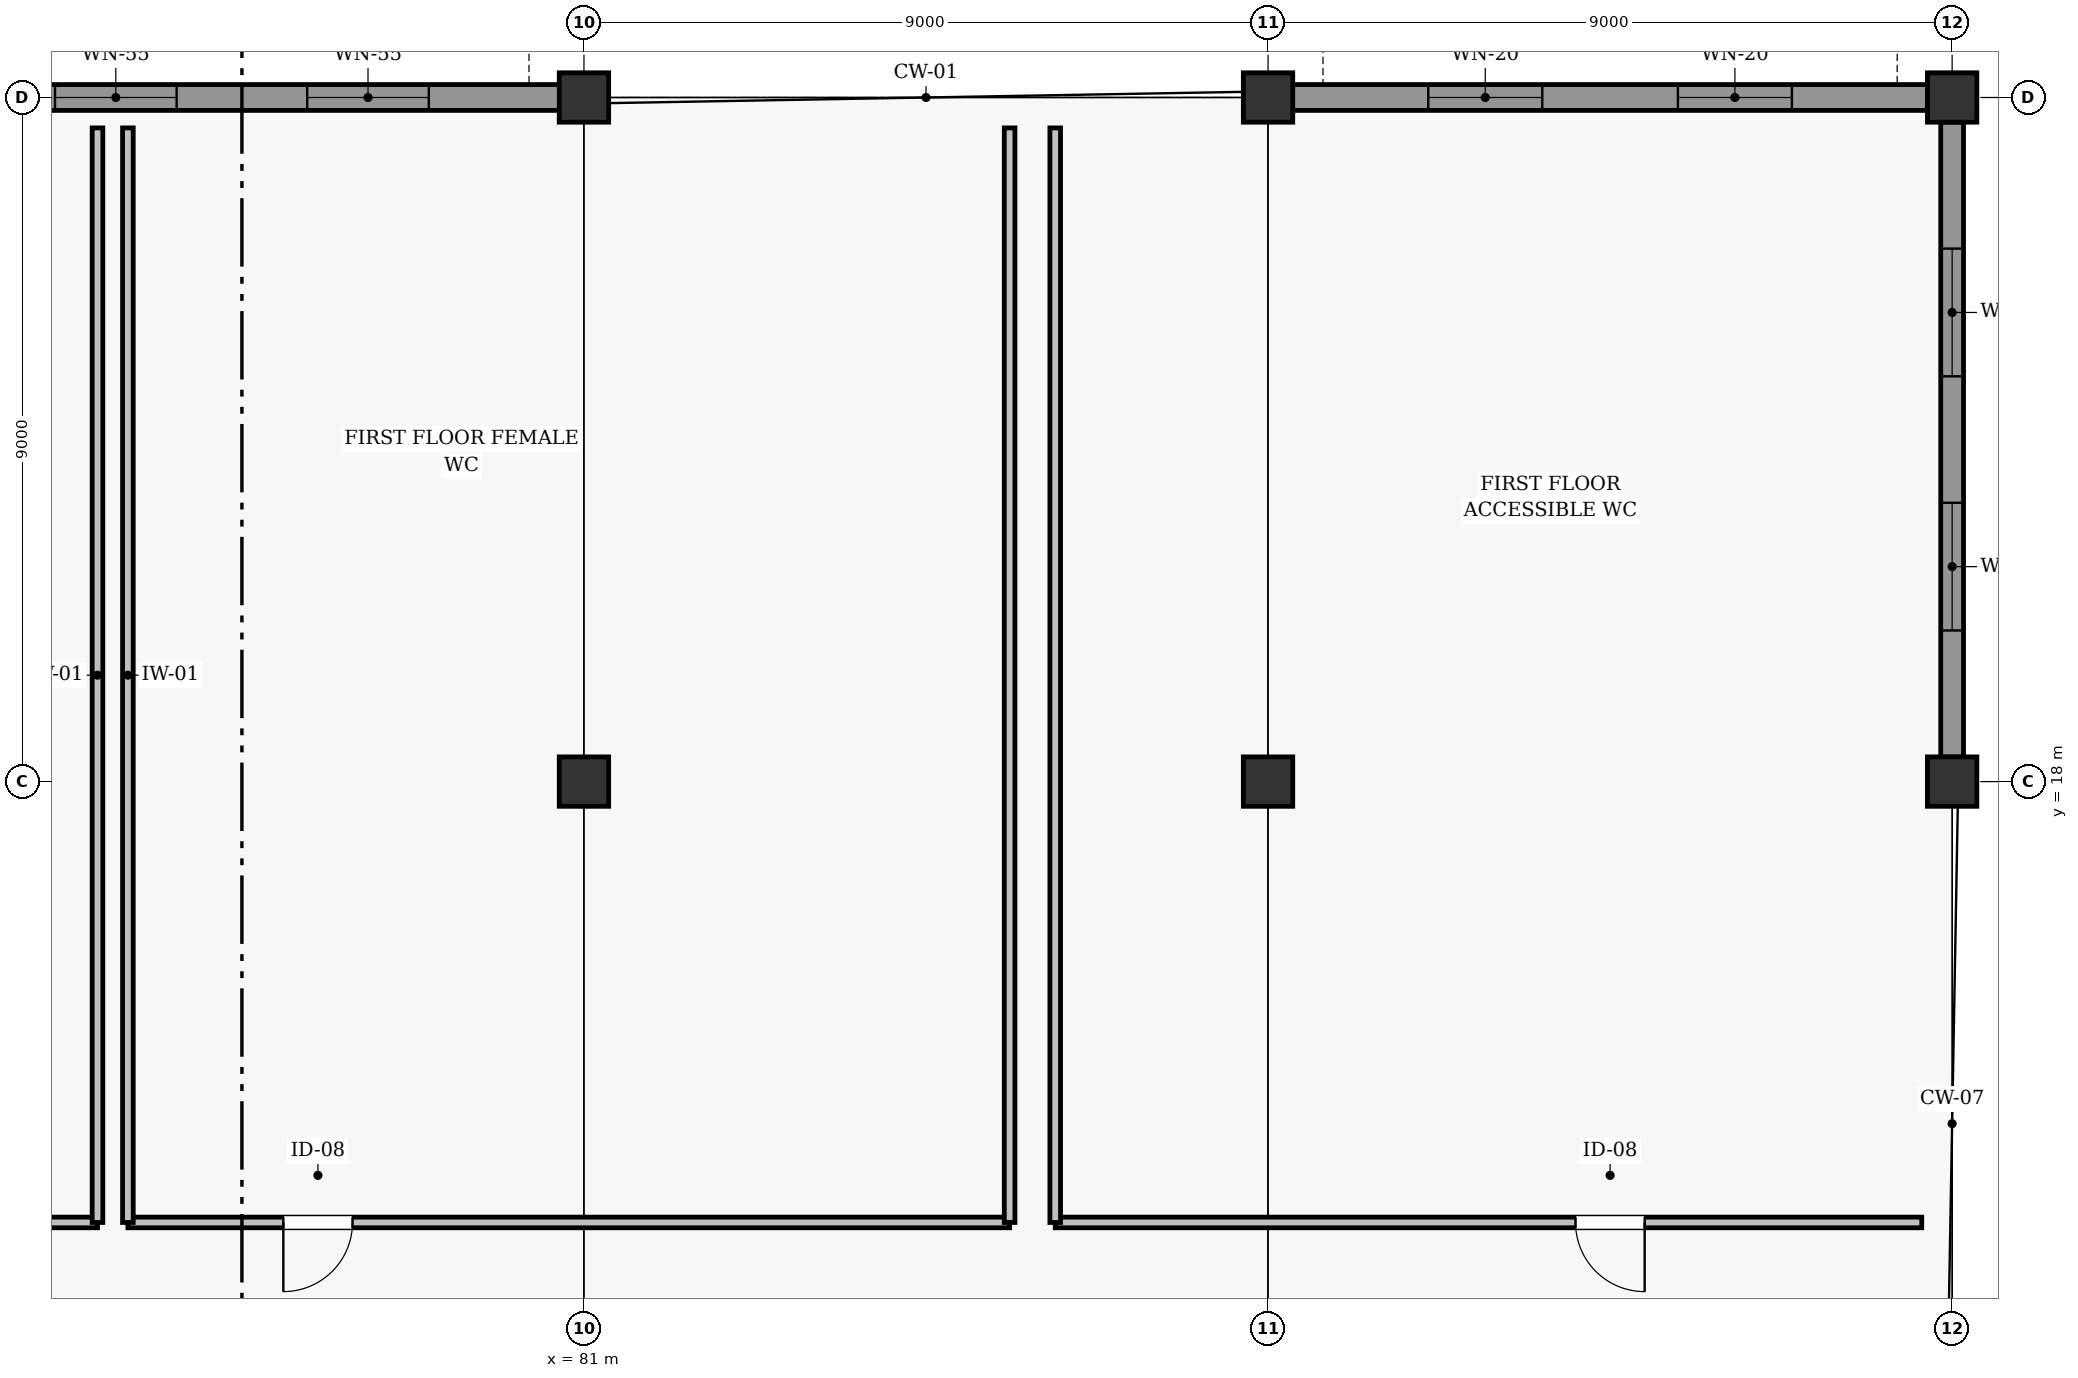
"""IFC4 building model, lengths in metres.
Left out: names, types, materials, properties, quantities, classifications, styles, units other than length and angle.
Written with IfcOpenShell. Run it as: python <this file> out.ifc"""

import sys

from ifc_helpers import new_model, si_unit, direction, frame, frame_2d, origin, origin_2d, place, context, subcontext, project, spatial, rectangle, extrude, element, fill, save


model = new_model("IFC4")
c1 = context("Model", 3, precision=1e-05, world=origin(), true_north=direction((0.0, 1.0)))
c2 = subcontext(c1, "Body", "Model", "MODEL_VIEW")
j1 = project(units=[si_unit("LENGTHUNIT", "METRE"), si_unit("PLANEANGLEUNIT", "RADIAN")], contexts=[c1])
p1 = place(None, origin())
s1 = spatial("IfcSite", under=j1, at=p1, CompositionType="ELEMENT")
p2 = place(p1, origin())
s2 = spatial("IfcBuilding", under=s1, at=p2, CompositionType="ELEMENT")
p3 = place(p2, frame((0.0, 0.0, 4.8)))
s3 = spatial("IfcBuildingStorey", under=s2, at=p3, CompositionType="ELEMENT", Elevation=4.8)
for number, where, z_axis, x_axis in (
    (1, (81.0, 18.0, 0.0), (0.0, 0.0, 1.0), (1.0, 0.0, 0.0)),
    (2, (81.0, 27.0, 0.0), (0.0, 0.0, 1.0), (1.0, 0.0, 0.0)),
    (3, (90.0, 18.0, 0.0), (0.0, 0.0, 1.0), (1.0, 0.0, 0.0)),
    (4, (90.0, 27.0, 0.0), (0.0, 0.0, 1.0), (1.0, 0.0, 0.0)),
    (5, (99.0, 18.0, 0.0), (0.0, 0.0, 1.0), (1.0, 0.0, 0.0)),
    (6, (99.0, 27.0, 0.0), (0.0, 0.0, 1.0), (1.0, 0.0, 0.0)),
):
    element("IfcColumn", number, at=place(p3, frame(where, z_axis=z_axis, x_axis=x_axis)), inside=s3, PredefinedType="COLUMN", context=c2, shape_type="SweptSolid", body=[
        extrude(rectangle(XDim=0.65, YDim=0.65, at=origin_2d()), origin(), (0.0, 0.0, 1.0), 3.6),
    ])
p4 = place(p3, frame((72.323, 27.0, 0.0), z_axis=(0.0, 0.0, 1.0), x_axis=(1.0, 0.0, 0.0)))
e7 = element("IfcWall", 7, at=p4, inside=s3, PredefinedType="SOLIDWALL", context=c2, shape_type="SweptSolid", body=[
    extrude(rectangle(XDim=8.354, YDim=0.34, at=frame_2d((4.177, 0.0))), origin(), (0.0, 0.0, 1.0), 2.642),
])
p5 = place(p4, frame((1.718, 0.0, 0.6)))
e8 = element("IfcOpeningElement", 8, at=p5, cuts=e7, PredefinedType="OPENING", context=c2, shape_type="SweptSolid", body=[
    extrude(rectangle(XDim=1.6, YDim=1.86, at=frame_2d((0.8, 0.93))), frame((0.0, 0.18, 0.0), z_axis=(0.0, -1.0, 0.0), x_axis=(1.0, 0.0, 0.0)), (0.0, 0.0, 1.0), 0.36),
])
p6 = place(p4, frame((5.036, 0.0, 0.6)))
e9 = element("IfcOpeningElement", 9, at=p6, cuts=e7, PredefinedType="OPENING", context=c2, shape_type="SweptSolid", body=[
    extrude(rectangle(XDim=1.6, YDim=1.86, at=frame_2d((0.8, 0.93))), frame((0.0, 0.18, 0.0), z_axis=(0.0, -1.0, 0.0), x_axis=(1.0, 0.0, 0.0)), (0.0, 0.0, 1.0), 0.36),
])
p7 = place(p3, frame((90.323, 27.0, 0.0), z_axis=(0.0, 0.0, 1.0), x_axis=(1.0, 0.0, 0.0)))
e10 = element("IfcWall", 10, at=p7, inside=s3, PredefinedType="SOLIDWALL", context=c2, shape_type="SweptSolid", body=[
    extrude(rectangle(XDim=8.354, YDim=0.34, at=frame_2d((4.177, 0.0))), origin(), (0.0, 0.0, 1.0), 2.702),
])
p8 = place(p7, frame((1.785, 0.0, 0.85)))
e11 = element("IfcOpeningElement", 11, at=p8, cuts=e10, PredefinedType="OPENING", context=c2, shape_type="SweptSolid", body=[
    extrude(rectangle(XDim=1.5, YDim=1.55, at=frame_2d((0.75, 0.775))), frame((0.0, 0.18, 0.0), z_axis=(0.0, -1.0, 0.0), x_axis=(1.0, 0.0, 0.0)), (0.0, 0.0, 1.0), 0.36),
])
p9 = place(p7, frame((5.069, 0.0, 0.85)))
e12 = element("IfcOpeningElement", 12, at=p9, cuts=e10, PredefinedType="OPENING", context=c2, shape_type="SweptSolid", body=[
    extrude(rectangle(XDim=1.5, YDim=1.55, at=frame_2d((0.75, 0.775))), frame((0.0, 0.18, 0.0), z_axis=(0.0, -1.0, 0.0), x_axis=(1.0, 0.0, 0.0)), (0.0, 0.0, 1.0), 0.36),
])
p10 = place(p3, frame((99.0, 18.323, 0.0), z_axis=(0.0, 0.0, 1.0), x_axis=(0.0, 1.0, 0.0)))
e13 = element("IfcWall", 13, at=p10, inside=s3, PredefinedType="SOLIDWALL", context=c2, shape_type="SweptSolid", body=[
    extrude(rectangle(XDim=8.354, YDim=0.3, at=frame_2d((4.177, 0.0))), origin(), (0.0, 0.0, 1.0), 2.902),
])
p11 = place(p10, frame((1.665, 0.0, 0.85)))
e14 = element("IfcOpeningElement", 14, at=p11, cuts=e13, PredefinedType="OPENING", context=c2, shape_type="SweptSolid", body=[
    extrude(rectangle(XDim=1.68, YDim=1.66, at=frame_2d((0.84, 0.83))), frame((0.0, 0.16, 0.0), z_axis=(0.0, -1.0, 0.0), x_axis=(1.0, 0.0, 0.0)), (0.0, 0.0, 1.0), 0.32),
])
p12 = place(p10, frame((5.009, 0.0, 0.85)))
e15 = element("IfcOpeningElement", 15, at=p12, cuts=e13, PredefinedType="OPENING", context=c2, shape_type="SweptSolid", body=[
    extrude(rectangle(XDim=1.68, YDim=1.66, at=frame_2d((0.84, 0.83))), frame((0.0, 0.16, 0.0), z_axis=(0.0, -1.0, 0.0), x_axis=(1.0, 0.0, 0.0)), (0.0, 0.0, 1.0), 0.32),
])
p13 = place(p3, frame((63.4, 12.2, 0.0), z_axis=(0.0, 0.0, 1.0), x_axis=(1.0, 0.0, 0.0)))
e16 = element("IfcWall", 16, at=p13, inside=s3, PredefinedType="PARTITIONING", context=c2, shape_type="SweptSolid", body=[
    extrude(rectangle(XDim=11.2, YDim=0.14, at=frame_2d((5.6, 0.0))), origin(), (0.0, 0.0, 1.0), 2.695),
])
p14 = place(p13, frame((3.645, 0.0, 0.0)))
e17 = element("IfcOpeningElement", 17, at=p14, cuts=e16, PredefinedType="OPENING", context=c2, shape_type="SweptSolid", body=[
    extrude(rectangle(XDim=0.91, YDim=2.04, at=frame_2d((0.455, 1.02))), frame((0.0, 0.08, 0.0), z_axis=(0.0, -1.0, 0.0), x_axis=(1.0, 0.0, 0.0)), (0.0, 0.0, 1.0), 0.16),
])
p15 = place(p3, frame((74.6, 12.2, 0.0), z_axis=(0.0, 0.0, 1.0), x_axis=(0.0, 1.0, 0.0)))
e18 = element("IfcWall", 18, at=p15, inside=s3, PredefinedType="PARTITIONING", context=c2, shape_type="SweptSolid", body=[
    extrude(rectangle(XDim=14.4, YDim=0.14, at=frame_2d((7.2, 0.0))), origin(), (0.0, 0.0, 1.0), 2.595),
])
p16 = place(p3, frame((75.0, 12.2, 0.0), z_axis=(0.0, 0.0, 1.0), x_axis=(1.0, 0.0, 0.0)))
e19 = element("IfcWall", 19, at=p16, inside=s3, PredefinedType="PARTITIONING", context=c2, shape_type="SweptSolid", body=[
    extrude(rectangle(XDim=11.6, YDim=0.14, at=frame_2d((5.8, 0.0))), origin(), (0.0, 0.0, 1.0), 2.695),
])
p17 = place(p16, frame((2.045, 0.0, 0.0)))
e20 = element("IfcOpeningElement", 20, at=p17, cuts=e19, PredefinedType="OPENING", context=c2, shape_type="SweptSolid", body=[
    extrude(rectangle(XDim=0.91, YDim=2.04, at=frame_2d((0.455, 1.02))), frame((0.0, 0.08, 0.0), z_axis=(0.0, -1.0, 0.0), x_axis=(1.0, 0.0, 0.0)), (0.0, 0.0, 1.0), 0.16),
])
for number, where, z_axis, x_axis in (
    (21, (75.0, 12.2, 0.0), (0.0, 0.0, 1.0), (0.0, 1.0, 0.0)),
    (22, (86.6, 12.2, 0.0), (0.0, 0.0, 1.0), (0.0, 1.0, 0.0)),
):
    element("IfcWall", number, at=place(p3, frame(where, z_axis=z_axis, x_axis=x_axis)), inside=s3, PredefinedType="PARTITIONING", context=c2, shape_type="SweptSolid", body=[
        extrude(rectangle(XDim=14.4, YDim=0.14, at=frame_2d((7.2, 0.0))), origin(), (0.0, 0.0, 1.0), 2.595),
    ])
p18 = place(p3, frame((87.2, 12.2, 0.0), z_axis=(0.0, 0.0, 1.0), x_axis=(1.0, 0.0, 0.0)))
e23 = element("IfcWall", 23, at=p18, inside=s3, PredefinedType="PARTITIONING", context=c2, shape_type="SweptSolid", body=[
    extrude(rectangle(XDim=11.4, YDim=0.14, at=frame_2d((5.7, 0.0))), origin(), (0.0, 0.0, 1.0), 2.695),
])
p19 = place(p18, frame((6.845, 0.0, 0.0)))
e24 = element("IfcOpeningElement", 24, at=p19, cuts=e23, PredefinedType="OPENING", context=c2, shape_type="SweptSolid", body=[
    extrude(rectangle(XDim=0.91, YDim=2.04, at=frame_2d((0.455, 1.02))), frame((0.0, 0.08, 0.0), z_axis=(0.0, -1.0, 0.0), x_axis=(1.0, 0.0, 0.0)), (0.0, 0.0, 1.0), 0.16),
])
p20 = place(p3, frame((87.2, 12.2, 0.0), z_axis=(0.0, 0.0, 1.0), x_axis=(0.0, 1.0, 0.0)))
e25 = element("IfcWall", 25, at=p20, inside=s3, PredefinedType="PARTITIONING", context=c2, shape_type="SweptSolid", body=[
    extrude(rectangle(XDim=14.4, YDim=0.14, at=frame_2d((7.2, 0.0))), origin(), (0.0, 0.0, 1.0), 2.595),
])
p21 = place(p5, origin())
e26 = element("IfcWindow", 26, at=p21, inside=s3, PartitioningType="SINGLE_PANEL", PredefinedType="WINDOW", context=c2, shape_type="SweptSolid", body=[
    extrude(rectangle(XDim=1.6, YDim=1.86, at=frame_2d((0.8, 0.93))), frame((0.0, 0.03, 0.0), z_axis=(0.0, -1.0, 0.0), x_axis=(1.0, 0.0, 0.0)), (0.0, 0.0, 1.0), 0.06),
])
fill(e8, e26)
p22 = place(p6, origin())
e27 = element("IfcWindow", 27, at=p22, inside=s3, PartitioningType="SINGLE_PANEL", PredefinedType="WINDOW", context=c2, shape_type="SweptSolid", body=[
    extrude(rectangle(XDim=1.6, YDim=1.86, at=frame_2d((0.8, 0.93))), frame((0.0, 0.03, 0.0), z_axis=(0.0, -1.0, 0.0), x_axis=(1.0, 0.0, 0.0)), (0.0, 0.0, 1.0), 0.06),
])
fill(e9, e27)
p23 = place(p8, origin())
e28 = element("IfcWindow", 28, at=p23, inside=s3, PartitioningType="SINGLE_PANEL", PredefinedType="WINDOW", context=c2, shape_type="SweptSolid", body=[
    extrude(rectangle(XDim=1.5, YDim=1.55, at=frame_2d((0.75, 0.775))), frame((0.0, 0.03, 0.0), z_axis=(0.0, -1.0, 0.0), x_axis=(1.0, 0.0, 0.0)), (0.0, 0.0, 1.0), 0.06),
])
fill(e11, e28)
p24 = place(p9, origin())
e29 = element("IfcWindow", 29, at=p24, inside=s3, PartitioningType="SINGLE_PANEL", PredefinedType="WINDOW", context=c2, shape_type="SweptSolid", body=[
    extrude(rectangle(XDim=1.5, YDim=1.55, at=frame_2d((0.75, 0.775))), frame((0.0, 0.03, 0.0), z_axis=(0.0, -1.0, 0.0), x_axis=(1.0, 0.0, 0.0)), (0.0, 0.0, 1.0), 0.06),
])
fill(e12, e29)
p25 = place(p11, origin())
e30 = element("IfcWindow", 30, at=p25, inside=s3, PartitioningType="SINGLE_PANEL", PredefinedType="WINDOW", context=c2, shape_type="SweptSolid", body=[
    extrude(rectangle(XDim=1.68, YDim=1.66, at=frame_2d((0.84, 0.83))), frame((0.0, 0.03, 0.0), z_axis=(0.0, -1.0, 0.0), x_axis=(1.0, 0.0, 0.0)), (0.0, 0.0, 1.0), 0.06),
])
fill(e14, e30)
p26 = place(p12, origin())
e31 = element("IfcWindow", 31, at=p26, inside=s3, PartitioningType="SINGLE_PANEL", PredefinedType="WINDOW", context=c2, shape_type="SweptSolid", body=[
    extrude(rectangle(XDim=1.68, YDim=1.66, at=frame_2d((0.84, 0.83))), frame((0.0, 0.03, 0.0), z_axis=(0.0, -1.0, 0.0), x_axis=(1.0, 0.0, 0.0)), (0.0, 0.0, 1.0), 0.06),
])
fill(e15, e31)
p27 = place(p17, frame((0.91, 0.0, 0.0), z_axis=(0.0, 0.0, 1.0), x_axis=(-1.0, 0.0, 0.0)))
e32 = element("IfcDoor", 32, at=p27, inside=s3, OperationType="SINGLE_SWING_LEFT", PredefinedType="DOOR", context=c2, shape_type="SweptSolid", body=[
    extrude(rectangle(XDim=0.91, YDim=2.04, at=frame_2d((0.455, 1.02))), frame((0.0, 0.025, 0.0), z_axis=(0.0, -1.0, 0.0), x_axis=(1.0, 0.0, 0.0)), (0.0, 0.0, 1.0), 0.05),
])
fill(e20, e32)
p28 = place(p19, frame((0.91, 0.0, 0.0), z_axis=(0.0, 0.0, 1.0), x_axis=(-1.0, 0.0, 0.0)))
e33 = element("IfcDoor", 33, at=p28, inside=s3, OperationType="SINGLE_SWING_RIGHT", PredefinedType="DOOR", context=c2, shape_type="SweptSolid", body=[
    extrude(rectangle(XDim=0.91, YDim=2.04, at=frame_2d((0.455, 1.02))), frame((0.0, 0.025, 0.0), z_axis=(0.0, -1.0, 0.0), x_axis=(1.0, 0.0, 0.0)), (0.0, 0.0, 1.0), 0.05),
])
fill(e24, e33)
save(model, sys.argv[1])
